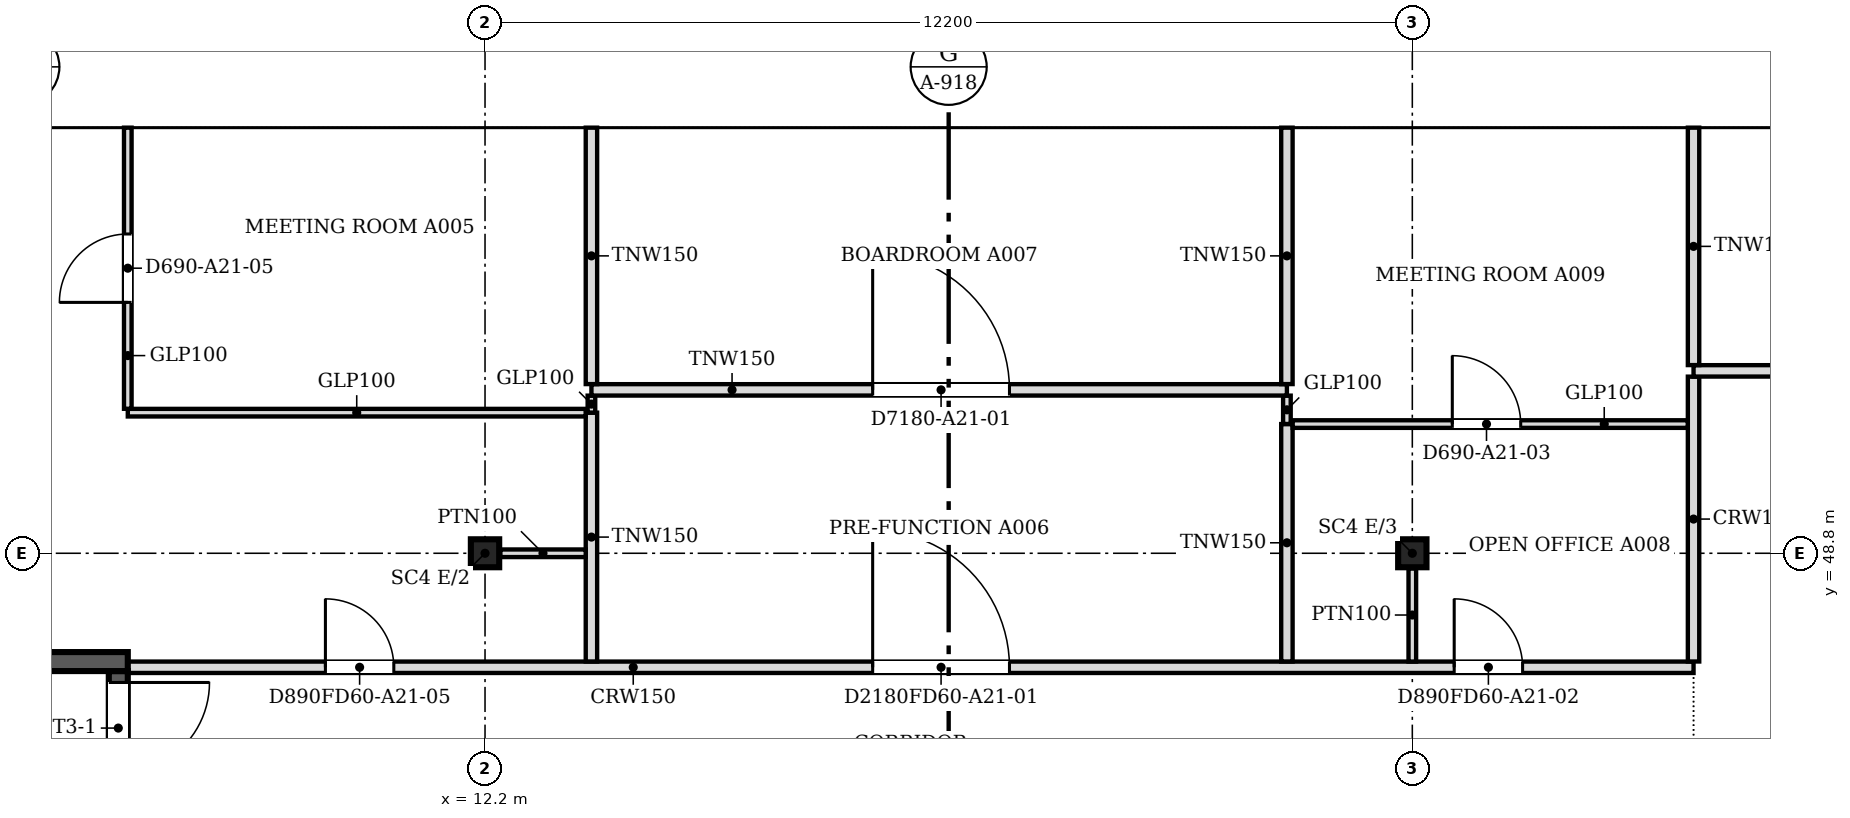
"""IFC4 building model, lengths in metres.
Left out: names, types, materials, properties, quantities, classifications, styles, units other than length and angle.
Written with IfcOpenShell. Run it as: python <this file> out.ifc"""

import sys

from ifc_helpers import new_model, si_unit, direction, frame, frame_2d, origin, origin_2d, place, context, subcontext, project, spatial, polyline, rectangle, i_section, outline, extrude, faceted_brep, source, transform, mapped, element, fill, save


model = new_model("IFC4")
c1 = context("Model", 3, precision=1e-05, world=origin(), true_north=direction((0.0, 1.0)))
c2 = subcontext(c1, "Body", "Model", "MODEL_VIEW")
j1 = project(units=[si_unit("LENGTHUNIT", "METRE"), si_unit("PLANEANGLEUNIT", "RADIAN")], contexts=[c1])
p1 = place(None, origin())
s1 = spatial("IfcSite", under=j1, at=p1, CompositionType="ELEMENT")
p2 = place(p1, origin())
s2 = spatial("IfcBuilding", under=s1, at=p2, CompositionType="ELEMENT")
p3 = place(p2, frame((0.0, 0.0, 240.7)))
s3 = spatial("IfcBuildingStorey", under=s2, at=p3, CompositionType="ELEMENT", Elevation=240.7)
for number, where, z_axis, x_axis in (
    (1, (12.2, 48.8, 0.0), (0.0, 0.0, 1.0), (1.0, 0.0, 0.0)),
    (2, (24.4, 48.8, 0.0), (0.0, 0.0, 1.0), (1.0, 0.0, 0.0)),
):
    element("IfcColumn", number, at=place(p3, frame(where, z_axis=z_axis, x_axis=x_axis)), inside=s3, PredefinedType="COLUMN", context=c2, shape_type="SweptSolid", body=[
        extrude(i_section(OverallWidth=0.373, OverallDepth=0.368, WebThickness=0.015, FlangeThickness=0.024, at=origin_2d()), origin(), (0.0, 0.0, 1.0), 3.6),
    ])
m1 = source(origin(), c2, "Body", "SweptSolid", [
    extrude(outline(polyline([(3.05, 0.0), (6.1, 3.8), (3.05, 7.6), (0.0, 3.8), (3.05, 0.0)])), frame((0.0, 0.25, 0.0), z_axis=(0.0, -1.0, 0.0), x_axis=(1.0, 0.0, 0.0)), (0.0, 0.0, 1.0), 0.5),
])
p4 = place(p3, frame((30.5, 54.65, -3.8), z_axis=(0.0, 0.0, 1.0), x_axis=(-1.0, 0.0, 0.0)))
e3 = element("IfcWall", 3, at=p4, inside=s3, PredefinedType="SOLIDWALL", context=c2, shape_type="MappedRepresentation", body=[
    mapped(m1, transform((0.0, 0.0, 0.0), scale=1.0)),
])
m2 = source(origin(), c2, "Body", "SweptSolid", [
    extrude(outline(polyline([(3.05, 0.399), (5.78, 3.8), (3.05, 7.201), (0.321, 3.8), (3.05, 0.399)])), frame((0.0, 0.26, 0.0), z_axis=(0.0, -1.0, 0.0), x_axis=(1.0, 0.0, 0.0)), (0.0, 0.0, 1.0), 0.52),
])
p5 = place(p4, origin())
e4 = element("IfcOpeningElement", 4, at=p5, cuts=e3, PredefinedType="OPENING", context=c2, shape_type="MappedRepresentation", body=[
    mapped(m2, transform((0.0, 0.0, 0.0), scale=1.0)),
])
m3 = source(origin(), c2, "Body", "Brep", [
    faceted_brep([(3.05, -0.25, 0.0), (6.1, -0.25, 3.8), (6.1, -0.25, 3.8), (3.05, -0.25, 7.6), (0.0, -0.25, 3.8), (0.0, 0.25, 3.8), (3.05, 0.25, 7.6), (6.1, 0.25, 3.8), (6.1, 0.25, 3.8), (3.05, 0.25, 0.0)], [[[0, 1, 2, 3, 4]], [[5, 6, 7, 8, 9]], [[9, 8, 1, 0]], [[7, 6, 3, 2]], [[6, 5, 4, 3]], [[5, 9, 0, 4]], [[1, 8, 7, 2]]]),
])
p6 = place(p3, frame((24.4, 54.65, -3.8), z_axis=(0.0, 0.0, 1.0), x_axis=(-1.0, 0.0, 0.0)))
e5 = element("IfcWall", 5, at=p6, inside=s3, PredefinedType="SOLIDWALL", context=c2, shape_type="MappedRepresentation", body=[
    mapped(m3, transform((0.0, 0.0, 0.0), scale=1.0)),
])
p7 = place(p6, origin())
e6 = element("IfcOpeningElement", 6, at=p7, cuts=e5, PredefinedType="OPENING", context=c2, shape_type="MappedRepresentation", body=[
    mapped(m2, transform((0.0, 0.0, 0.0), scale=1.0)),
])
p8 = place(p3, frame((18.3, 54.65, -3.8), z_axis=(0.0, 0.0, 1.0), x_axis=(-1.0, 0.0, 0.0)))
e7 = element("IfcWall", 7, at=p8, inside=s3, PredefinedType="SOLIDWALL", context=c2, shape_type="MappedRepresentation", body=[
    mapped(m1, transform((0.0, 0.0, 0.0), scale=1.0)),
])
p9 = place(p8, origin())
e8 = element("IfcOpeningElement", 8, at=p9, cuts=e7, PredefinedType="OPENING", context=c2, shape_type="MappedRepresentation", body=[
    mapped(m2, transform((0.0, 0.0, 0.0), scale=1.0)),
])
m4 = source(origin(), c2, "Body", "Brep", [
    faceted_brep([(3.05, -0.25, 0.0), (6.053, -0.25, 3.8), (3.05, -0.25, 7.6), (0.0, -0.25, 3.8), (0.0, 0.25, 3.8), (3.05, 0.25, 7.6), (6.007, 0.25, 3.859), (6.007, 0.25, 3.741), (3.05, 0.25, 0.0), (6.053, 0.0, 3.8)], [[[0, 1, 2, 3]], [[4, 5, 6, 7, 8]], [[8, 7, 9, 1, 0]], [[6, 5, 2, 1, 9]], [[5, 4, 3, 2]], [[4, 8, 0, 3]], [[9, 7, 6]]]),
])
p10 = place(p3, frame((12.2, 54.65, -3.8), z_axis=(0.0, 0.0, 1.0), x_axis=(-1.0, 0.0, 0.0)))
e9 = element("IfcWall", 9, at=p10, inside=s3, PredefinedType="SOLIDWALL", context=c2, shape_type="MappedRepresentation", body=[
    mapped(m4, transform((0.0, 0.0, 0.0), scale=1.0)),
])
m5 = source(origin(), c2, "Body", "SweptSolid", [
    extrude(outline(polyline([(3.049, 0.401), (5.735, 3.8), (3.049, 7.199), (0.321, 3.8), (3.049, 0.401)])), frame((0.0, 0.26, 0.0), z_axis=(0.0, -1.0, 0.0), x_axis=(1.0, 0.0, 0.0)), (0.0, 0.0, 1.0), 0.52),
])
p11 = place(p10, origin())
e10 = element("IfcOpeningElement", 10, at=p11, cuts=e9, PredefinedType="OPENING", context=c2, shape_type="MappedRepresentation", body=[
    mapped(m5, transform((0.0, 0.0, 0.0), scale=1.0)),
])
p12 = place(p2, frame((0.0, 0.0, 244.5)))
s4 = spatial("IfcBuildingStorey", under=s2, at=p12, CompositionType="ELEMENT", Elevation=244.5)
p13 = place(p12, frame((33.55, 54.65, -3.8), z_axis=(0.0, 0.0, 1.0), x_axis=(-1.0, 0.0, 0.0)))
e11 = element("IfcWall", 11, at=p13, inside=s4, PredefinedType="SOLIDWALL", context=c2, shape_type="MappedRepresentation", body=[
    mapped(m1, transform((0.0, 0.0, 0.0), scale=1.0)),
])
p14 = place(p13, origin())
e12 = element("IfcOpeningElement", 12, at=p14, cuts=e11, PredefinedType="OPENING", context=c2, shape_type="MappedRepresentation", body=[
    mapped(m2, transform((0.0, 0.0, 0.0), scale=1.0)),
])
p15 = place(p12, frame((27.45, 54.65, -3.8), z_axis=(0.0, 0.0, 1.0), x_axis=(-1.0, 0.0, 0.0)))
e13 = element("IfcWall", 13, at=p15, inside=s4, PredefinedType="SOLIDWALL", context=c2, shape_type="MappedRepresentation", body=[
    mapped(m3, transform((0.0, 0.0, 0.0), scale=1.0)),
])
p16 = place(p15, origin())
e14 = element("IfcOpeningElement", 14, at=p16, cuts=e13, PredefinedType="OPENING", context=c2, shape_type="MappedRepresentation", body=[
    mapped(m2, transform((0.0, 0.0, 0.0), scale=1.0)),
])
p17 = place(p12, frame((21.35, 54.65, -3.8), z_axis=(0.0, 0.0, 1.0), x_axis=(-1.0, 0.0, 0.0)))
e15 = element("IfcWall", 15, at=p17, inside=s4, PredefinedType="SOLIDWALL", context=c2, shape_type="MappedRepresentation", body=[
    mapped(m1, transform((0.0, 0.0, 0.0), scale=1.0)),
])
p18 = place(p17, origin())
e16 = element("IfcOpeningElement", 16, at=p18, cuts=e15, PredefinedType="OPENING", context=c2, shape_type="MappedRepresentation", body=[
    mapped(m2, transform((0.0, 0.0, 0.0), scale=1.0)),
])
p19 = place(p12, frame((15.25, 54.65, -3.8), z_axis=(0.0, 0.0, 1.0), x_axis=(-1.0, 0.0, 0.0)))
e17 = element("IfcWall", 17, at=p19, inside=s4, PredefinedType="SOLIDWALL", context=c2, shape_type="MappedRepresentation", body=[
    mapped(m1, transform((0.0, 0.0, 0.0), scale=1.0)),
])
p20 = place(p19, origin())
e18 = element("IfcOpeningElement", 18, at=p20, cuts=e17, PredefinedType="OPENING", context=c2, shape_type="MappedRepresentation", body=[
    mapped(m2, transform((0.0, 0.0, 0.0), scale=1.0)),
])
m6 = source(origin(), c2, "Body", "Brep", [
    faceted_brep([(3.003, -0.25, 0.0), (3.05, -0.25, 0.06), (3.05, -0.25, 7.54), (3.003, -0.25, 7.6), (0.0, -0.25, 3.8), (0.0, 0.25, 3.8), (2.957, 0.25, 7.541), (2.957, 0.25, 0.059), (3.003, 0.0, 0.0), (3.003, 0.0, 7.6)], [[[0, 1, 2, 3, 4]], [[5, 6, 7]], [[1, 0, 8]], [[9, 3, 2]], [[6, 5, 4, 3, 9]], [[5, 7, 8, 0, 4]], [[1, 8, 7, 6, 9, 2]]]),
])
p21 = place(p12, frame((9.15, 54.65, -3.8), z_axis=(0.0, 0.0, 1.0), x_axis=(-1.0, 0.0, 0.0)))
e19 = element("IfcWall", 19, at=p21, inside=s4, PredefinedType="SOLIDWALL", context=c2, shape_type="MappedRepresentation", body=[
    mapped(m6, transform((0.0, 0.0, 0.0), scale=1.0)),
])
m7 = source(origin(), c2, "Body", "SweptSolid", [
    extrude(outline(polyline([(2.803, 6.944), (0.319, 3.8), (2.803, 0.656), (2.803, 6.944)])), frame((0.0, 0.26, 0.0), z_axis=(0.0, -1.0, 0.0), x_axis=(1.0, 0.0, 0.0)), (0.0, 0.0, 1.0), 0.52),
])
p22 = place(p21, origin())
e20 = element("IfcOpeningElement", 20, at=p22, cuts=e19, PredefinedType="OPENING", context=c2, shape_type="MappedRepresentation", body=[
    mapped(m7, transform((0.0, 0.0, 0.0), scale=1.0)),
])
p23 = place(p3, frame((3.6, 47.375, 0.0), z_axis=(0.0, 0.0, 1.0), x_axis=(1.0, 0.0, 0.0)))
e21 = element("IfcWall", 21, at=p23, inside=s3, PredefinedType="SOLIDWALL", context=c2, shape_type="SweptSolid", body=[
    extrude(rectangle(XDim=3.9, YDim=0.25, at=frame_2d((1.95, 0.0))), origin(), (0.0, 0.0, 1.0), 3.8),
])
p24 = place(p3, frame((7.375, 47.25, 0.0), z_axis=(0.0, 0.0, 1.0), x_axis=(0.0, -1.0, 0.0)))
e22 = element("IfcWall", 22, at=p24, inside=s3, PredefinedType="SOLIDWALL", context=c2, shape_type="SweptSolid", body=[
    extrude(rectangle(XDim=8.0, YDim=0.25, at=frame_2d((4.0, 0.0))), origin(), (0.0, 0.0, 1.0), 3.8),
])
m8 = source(origin(), c2, "Body", "SweptSolid", [
    extrude(rectangle(XDim=1.2, YDim=2.1, at=frame_2d((0.6, 1.05))), frame((0.0, 0.135, 0.0), z_axis=(0.0, -1.0, 0.0), x_axis=(1.0, 0.0, 0.0)), (0.0, 0.0, 1.0), 0.27),
])
p25 = place(p24, frame((0.15, 0.0, 0.0)))
e23 = element("IfcOpeningElement", 23, at=p25, cuts=e22, PredefinedType="OPENING", context=c2, shape_type="MappedRepresentation", body=[
    mapped(m8, transform((0.0, 0.0, 0.0), scale=1.0)),
])
p26 = place(p3, frame((7.5, 47.3, 0.0), z_axis=(0.0, 0.0, 1.0), x_axis=(1.0, 0.0, 0.0)))
e24 = element("IfcWall", 24, at=p26, inside=s3, PredefinedType="PARTITIONING", context=c2, shape_type="SweptSolid", body=[
    extrude(rectangle(XDim=20.6, YDim=0.15, at=frame_2d((10.3, 0.0))), origin(), (0.0, 0.0, 1.0), 3.067),
])
m9 = source(origin(), c2, "Body", "SweptSolid", [
    extrude(rectangle(XDim=0.9, YDim=2.1, at=frame_2d((0.45, 1.05))), frame((0.0, 0.085, 0.0), z_axis=(0.0, -1.0, 0.0), x_axis=(1.0, 0.0, 0.0)), (0.0, 0.0, 1.0), 0.17),
])
p27 = place(p26, frame((17.451, 0.0, 0.0)))
e25 = element("IfcOpeningElement", 25, at=p27, cuts=e24, PredefinedType="OPENING", context=c2, shape_type="MappedRepresentation", body=[
    mapped(m9, transform((0.0, 0.0, 0.0), scale=1.0)),
])
p28 = place(p26, frame((2.6, 0.0, 0.0)))
e26 = element("IfcOpeningElement", 26, at=p28, cuts=e24, PredefinedType="OPENING", context=c2, shape_type="MappedRepresentation", body=[
    mapped(m9, transform((0.0, 0.0, 0.0), scale=1.0)),
])
m10 = source(origin(), c2, "Body", "SweptSolid", [
    extrude(rectangle(XDim=1.8, YDim=2.1, at=frame_2d((0.9, 1.05))), frame((0.0, 0.085, 0.0), z_axis=(0.0, -1.0, 0.0), x_axis=(1.0, 0.0, 0.0)), (0.0, 0.0, 1.0), 0.17),
])
p29 = place(p26, frame((9.8, 0.0, 0.0)))
e27 = element("IfcOpeningElement", 27, at=p29, cuts=e24, PredefinedType="OPENING", context=c2, shape_type="MappedRepresentation", body=[
    mapped(m10, transform((0.0, 0.0, 0.0), scale=1.0)),
])
p30 = place(p3, frame((13.6, 47.376, 0.0), z_axis=(0.0, 0.0, 1.0), x_axis=(0.0, 1.0, 0.0)))
e28 = element("IfcWall", 28, at=p30, inside=s3, PredefinedType="PARTITIONING", context=c2, shape_type="SweptSolid", body=[
    extrude(rectangle(XDim=3.274, YDim=0.15, at=frame_2d((1.637, 0.0))), origin(), (0.0, 0.0, 1.0), 3.067),
])
p31 = place(p3, frame((22.75, 47.376, 0.0), z_axis=(0.0, 0.0, 1.0), x_axis=(0.0, 1.0, 0.0)))
e29 = element("IfcWall", 29, at=p31, inside=s3, PredefinedType="PARTITIONING", context=c2, shape_type="SweptSolid", body=[
    extrude(rectangle(XDim=3.124, YDim=0.15, at=frame_2d((1.562, 0.0))), origin(), (0.0, 0.0, 1.0), 3.067),
])
p32 = place(p3, frame((28.1, 47.376, 0.0), z_axis=(0.0, 0.0, 1.0), x_axis=(0.0, 1.0, 0.0)))
e30 = element("IfcWall", 30, at=p32, inside=s3, PredefinedType="PARTITIONING", context=c2, shape_type="SweptSolid", body=[
    extrude(rectangle(XDim=3.748, YDim=0.15, at=frame_2d((1.874, 0.0))), origin(), (0.0, 0.0, 1.0), 3.067),
])
p33 = place(p3, frame((24.4, 48.6, 0.0), z_axis=(0.0, 0.0, 1.0), x_axis=(0.0, -1.0, 0.0)))
e31 = element("IfcWall", 31, at=p33, inside=s3, PredefinedType="PARTITIONING", context=c2, shape_type="SweptSolid", body=[
    extrude(rectangle(XDim=1.225, YDim=0.1, at=frame_2d((0.613, 0.0))), origin(), (0.0, 0.0, 1.0), 3.067),
])
p34 = place(p3, frame((12.4, 48.8, 0.0), z_axis=(0.0, 0.0, 1.0), x_axis=(1.0, 0.0, 0.0)))
e32 = element("IfcWall", 32, at=p34, inside=s3, PredefinedType="PARTITIONING", context=c2, shape_type="SweptSolid", body=[
    extrude(rectangle(XDim=1.125, YDim=0.1, at=frame_2d((0.562, 0.0))), origin(), (0.0, 0.0, 1.0), 3.067),
])
p35 = place(p3, frame((22.75, 50.501, 0.0), z_axis=(0.0, 0.0, 1.0), x_axis=(0.0, 1.0, 0.0)))
e33 = element("IfcWall", 33, at=p35, inside=s3, PredefinedType="PARTITIONING", context=c2, shape_type="SweptSolid", body=[
    extrude(rectangle(XDim=0.373, YDim=0.1, at=frame_2d((0.187, 0.0))), origin(), (0.0, 0.0, 1.0), 3.067),
])
p36 = place(p3, frame((22.826, 50.5, 0.0), z_axis=(0.0, 0.0, 1.0), x_axis=(1.0, 0.0, 0.0)))
e34 = element("IfcWall", 34, at=p36, inside=s3, PredefinedType="PARTITIONING", context=c2, shape_type="SweptSolid", body=[
    extrude(rectangle(XDim=5.198, YDim=0.1, at=frame_2d((2.599, 0.0))), origin(), (0.0, 0.0, 1.0), 3.067),
])
m11 = source(origin(), c2, "Body", "SweptSolid", [
    extrude(rectangle(XDim=0.9, YDim=2.1, at=frame_2d((0.45, 1.05))), frame((0.0, 0.06, 0.0), z_axis=(0.0, -1.0, 0.0), x_axis=(1.0, 0.0, 0.0)), (0.0, 0.0, 1.0), 0.12),
])
p37 = place(p36, frame((2.1, 0.0, 0.0)))
e35 = element("IfcOpeningElement", 35, at=p37, cuts=e34, PredefinedType="OPENING", context=c2, shape_type="MappedRepresentation", body=[
    mapped(m11, transform((0.0, 0.0, 0.0), scale=1.0)),
])
p38 = place(p3, frame((7.5, 50.65, 0.0), z_axis=(0.0, 0.0, 1.0), x_axis=(1.0, 0.0, 0.0)))
e36 = element("IfcWall", 36, at=p38, inside=s3, PredefinedType="PARTITIONING", context=c2, shape_type="SweptSolid", body=[
    extrude(rectangle(XDim=6.024, YDim=0.1, at=frame_2d((3.012, 0.0))), origin(), (0.0, 0.0, 1.0), 3.067),
])
p39 = place(p3, frame((13.6, 50.651, 0.0), z_axis=(0.0, 0.0, 1.0), x_axis=(0.0, 1.0, 0.0)))
e37 = element("IfcWall", 37, at=p39, inside=s3, PredefinedType="PARTITIONING", context=c2, shape_type="SweptSolid", body=[
    extrude(rectangle(XDim=0.223, YDim=0.1, at=frame_2d((0.112, 0.0))), origin(), (0.0, 0.0, 1.0), 3.067),
])
p40 = place(p3, frame((7.5, 54.4, 0.0), z_axis=(0.0, 0.0, 1.0), x_axis=(0.0, -1.0, 0.0)))
e38 = element("IfcWall", 38, at=p40, inside=s3, PredefinedType="PARTITIONING", context=c2, shape_type="SweptSolid", body=[
    extrude(rectangle(XDim=3.699, YDim=0.1, at=frame_2d((1.85, 0.0))), origin(), (0.0, 0.0, 1.0), 3.067),
])
p41 = place(p40, frame((1.399, 0.0, 0.0)))
e39 = element("IfcOpeningElement", 39, at=p41, cuts=e38, PredefinedType="OPENING", context=c2, shape_type="MappedRepresentation", body=[
    mapped(m11, transform((0.0, 0.0, 0.0), scale=1.0)),
])
p42 = place(p3, frame((13.6, 50.95, 0.0), z_axis=(0.0, 0.0, 1.0), x_axis=(1.0, 0.0, 0.0)))
e40 = element("IfcWall", 40, at=p42, inside=s3, PredefinedType="PARTITIONING", context=c2, shape_type="SweptSolid", body=[
    extrude(rectangle(XDim=9.15, YDim=0.15, at=frame_2d((4.575, 0.0))), origin(), (0.0, 0.0, 1.0), 3.067),
])
p43 = place(p42, frame((3.7, 0.0, 0.0)))
e41 = element("IfcOpeningElement", 41, at=p43, cuts=e40, PredefinedType="OPENING", context=c2, shape_type="MappedRepresentation", body=[
    mapped(m10, transform((0.0, 0.0, 0.0), scale=1.0)),
])
for number, where, z_axis, x_axis in (
    (42, (13.6, 51.026, 0.0), (0.0, 0.0, 1.0), (0.0, 1.0, 0.0)),
    (43, (22.75, 51.026, 0.0), (0.0, 0.0, 1.0), (0.0, 1.0, 0.0)),
):
    element("IfcWall", number, at=place(p3, frame(where, z_axis=z_axis, x_axis=x_axis)), inside=s3, PredefinedType="PARTITIONING", context=c2, shape_type="SweptSolid", body=[
        extrude(rectangle(XDim=3.374, YDim=0.15, at=frame_2d((1.687, 0.0))), origin(), (0.0, 0.0, 1.0), 3.067),
    ])
p44 = place(p3, frame((28.1, 51.2, 0.0), z_axis=(0.0, 0.0, 1.0), x_axis=(1.0, 0.0, 0.0)))
e44 = element("IfcWall", 44, at=p44, inside=s3, PredefinedType="PARTITIONING", context=c2, shape_type="SweptSolid", body=[
    extrude(rectangle(XDim=31.438, YDim=0.15, at=frame_2d((15.719, 0.0))), origin(), (0.0, 0.0, 1.0), 3.067),
])
p45 = place(p44, frame((4.1, 0.0, 0.0)))
e45 = element("IfcOpeningElement", 45, at=p45, cuts=e44, PredefinedType="OPENING", context=c2, shape_type="MappedRepresentation", body=[
    mapped(m9, transform((0.0, 0.0, 0.0), scale=1.0)),
])
p46 = place(p44, frame((25.951, 0.0, 0.0)))
e46 = element("IfcOpeningElement", 46, at=p46, cuts=e44, PredefinedType="OPENING", context=c2, shape_type="MappedRepresentation", body=[
    mapped(m9, transform((0.0, 0.0, 0.0), scale=1.0)),
])
p47 = place(p44, frame((14.75, 0.0, 0.0)))
e47 = element("IfcOpeningElement", 47, at=p47, cuts=e44, PredefinedType="OPENING", context=c2, shape_type="MappedRepresentation", body=[
    mapped(m9, transform((0.0, 0.0, 0.0), scale=1.0)),
])
p48 = place(p3, frame((28.1, 51.276, 0.0), z_axis=(0.0, 0.0, 1.0), x_axis=(0.0, 1.0, 0.0)))
e48 = element("IfcWall", 48, at=p48, inside=s3, PredefinedType="PARTITIONING", context=c2, shape_type="SweptSolid", body=[
    extrude(rectangle(XDim=3.124, YDim=0.15, at=frame_2d((1.562, 0.0))), origin(), (0.0, 0.0, 1.0), 3.067),
])
m12 = source(origin(), c2, "Body", "SweptSolid", [
    extrude(rectangle(XDim=1.2, YDim=2.1, at=frame_2d((0.6, 1.05))), frame((0.0, 0.025, 0.0), z_axis=(0.0, -1.0, 0.0), x_axis=(1.0, 0.0, 0.0)), (0.0, 0.0, 1.0), 0.05),
])
p49 = place(p25, origin())
e49 = element("IfcDoor", 49, at=p49, inside=s3, OperationType="SINGLE_SWING_LEFT", PredefinedType="DOOR", context=c2, shape_type="MappedRepresentation", body=[
    mapped(m12, transform((0.0, 0.0, 0.0), scale=1.0)),
])
fill(e23, e49)
m13 = source(origin(), c2, "Body", "SweptSolid", [
    extrude(rectangle(XDim=0.9, YDim=2.1, at=frame_2d((0.45, 1.05))), frame((0.0, 0.025, 0.0), z_axis=(0.0, -1.0, 0.0), x_axis=(1.0, 0.0, 0.0)), (0.0, 0.0, 1.0), 0.05),
])
p50 = place(p37, origin())
e50 = element("IfcDoor", 50, at=p50, inside=s3, OperationType="SINGLE_SWING_LEFT", PredefinedType="DOOR", context=c2, shape_type="MappedRepresentation", body=[
    mapped(m13, transform((0.0, 0.0, 0.0), scale=1.0)),
])
fill(e35, e50)
p51 = place(p27, origin())
e51 = element("IfcDoor", 51, at=p51, inside=s3, OperationType="SINGLE_SWING_LEFT", PredefinedType="DOOR", context=c2, shape_type="MappedRepresentation", body=[
    mapped(m13, transform((0.0, 0.0, 0.0), scale=1.0)),
])
fill(e25, e51)
p52 = place(p28, origin())
e52 = element("IfcDoor", 52, at=p52, inside=s3, OperationType="SINGLE_SWING_LEFT", PredefinedType="DOOR", context=c2, shape_type="MappedRepresentation", body=[
    mapped(m13, transform((0.0, 0.0, 0.0), scale=1.0)),
])
fill(e26, e52)
m14 = source(origin(), c2, "Body", "SweptSolid", [
    extrude(rectangle(XDim=1.8, YDim=2.1, at=frame_2d((0.9, 1.05))), frame((0.0, 0.025, 0.0), z_axis=(0.0, -1.0, 0.0), x_axis=(1.0, 0.0, 0.0)), (0.0, 0.0, 1.0), 0.05),
])
p53 = place(p29, origin())
e53 = element("IfcDoor", 53, at=p53, inside=s3, OperationType="DOUBLE_DOOR_SINGLE_SWING", PredefinedType="DOOR", context=c2, shape_type="MappedRepresentation", body=[
    mapped(m14, transform((0.0, 0.0, 0.0), scale=1.0)),
])
fill(e27, e53)
p54 = place(p43, origin())
e54 = element("IfcDoor", 54, at=p54, inside=s3, OperationType="DOUBLE_DOOR_SINGLE_SWING", PredefinedType="DOOR", context=c2, shape_type="MappedRepresentation", body=[
    mapped(m14, transform((0.0, 0.0, 0.0), scale=1.0)),
])
fill(e41, e54)
p55 = place(p41, origin())
e55 = element("IfcDoor", 55, at=p55, inside=s3, OperationType="SINGLE_SWING_RIGHT", PredefinedType="DOOR", context=c2, shape_type="MappedRepresentation", body=[
    mapped(m13, transform((0.0, 0.0, 0.0), scale=1.0)),
])
fill(e39, e55)
save(model, sys.argv[1])
